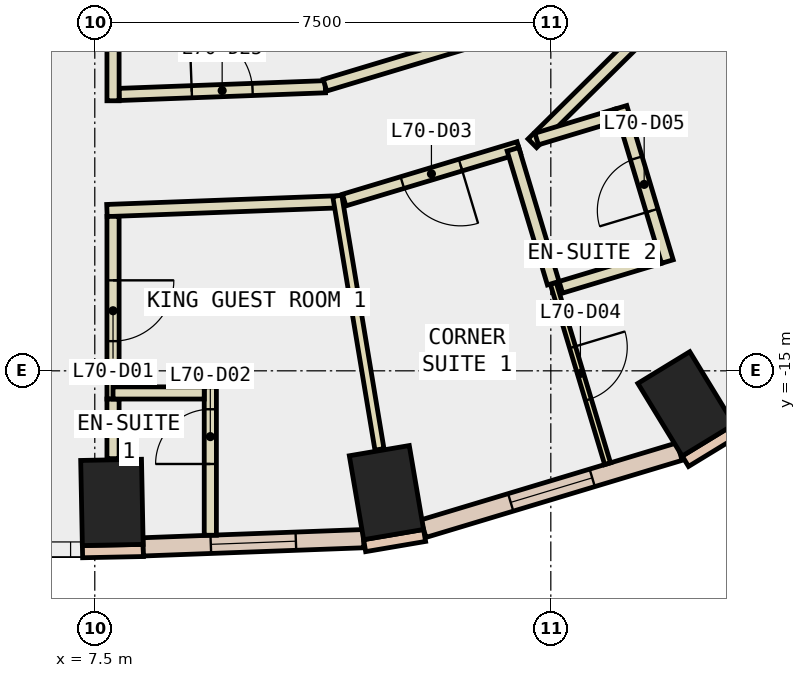
"""IFC4 building model, lengths in metres.
Left out: names, types, materials, properties, quantities, classifications, styles, units other than length and angle.
Written with IfcOpenShell. Run it as: python <this file> out.ifc"""

import sys

from ifc_helpers import new_model, si_unit, direction, frame, frame_2d, origin, origin_2d, place, context, subcontext, project, spatial, rectangle, extrude, element, fill, save


model = new_model("IFC4")
c1 = context("Model", 3, precision=1e-05, world=origin(), true_north=direction((0.0, 1.0)))
c2 = subcontext(c1, "Body", "Model", "MODEL_VIEW")
j1 = project(units=[si_unit("LENGTHUNIT", "METRE"), si_unit("PLANEANGLEUNIT", "RADIAN")], contexts=[c1])
p1 = place(None, origin())
s1 = spatial("IfcSite", under=j1, at=p1, CompositionType="ELEMENT")
p2 = place(p1, origin())
s2 = spatial("IfcBuilding", under=s1, at=p2, CompositionType="ELEMENT")
p3 = place(p2, frame((0.0, 0.0, 300.8)))
s3 = spatial("IfcBuildingStorey", under=s2, at=p3, CompositionType="ELEMENT", Elevation=300.8)
for number, where, z_axis, x_axis in (
    (1, (7.782, -17.164, -0.34), (0.0, 0.0, 1.0), (1.0, 0.02, 0.0)),
    (2, (12.297, -17.003, -0.34), (0.0, 0.0, 1.0), (0.986, 0.168, 0.0)),
    (3, (17.223, -15.544, -0.34), (0.0, 0.0, 1.0), (0.854, 0.521, 0.0)),
):
    element("IfcColumn", number, at=place(p3, frame(where, z_axis=z_axis, x_axis=x_axis)), inside=s3, PredefinedType="COLUMN", context=c2, shape_type="SweptSolid", body=[
        extrude(rectangle(XDim=1.0, YDim=1.4, at=origin_2d()), origin(), (0.0, 0.0, 1.0), 3.6),
    ])
for number, where, z_axis, x_axis in (
    (4, (7.298, -17.974, 0.0), (0.0, 0.0, 1.0), (1.0, 0.02, 0.0)),
    (5, (11.938, -17.875, 0.0), (0.0, 0.0, 1.0), (0.986, 0.168, 0.0)),
):
    element("IfcWall", number, at=place(p3, frame(where, z_axis=z_axis, x_axis=x_axis)), inside=s3, PredefinedType="STANDARD", context=c2, shape_type="SweptSolid", body=[
        extrude(rectangle(XDim=1.0, YDim=0.2, at=frame_2d((0.5, 0.0))), origin(), (0.0, 0.0, 1.0), 3.26),
    ])
p4 = place(p3, frame((17.213, -16.487, 0.0), z_axis=(0.0, 0.0, 1.0), x_axis=(0.853679739553, 0.520798331677, 0.0)))
e6 = element("IfcWall", 6, at=p4, inside=s3, PredefinedType="STANDARD", context=c2, shape_type="SweptSolid", body=[
    extrude(rectangle(XDim=1.0, YDim=0.2, at=frame_2d((0.5, 0.0))), origin(), (0.0, 0.0, 1.0), 3.26),
])
p5 = place(p3, frame((8.296, -17.895, 0.0), z_axis=(0.0, 0.0, 1.0), x_axis=(0.999306787149, 0.037228284377, 0.0)))
e7 = element("IfcWall", 7, at=p5, inside=s3, PredefinedType="STANDARD", context=c2, shape_type="SweptSolid", body=[
    extrude(rectangle(XDim=3.626, YDim=0.3, at=frame_2d((1.813, 0.0))), origin(), (0.0, 0.0, 1.0), 3.26),
])
p6 = place(p5, frame((1.113, 0.0, 0.9)))
e8 = element("IfcOpeningElement", 8, at=p6, cuts=e7, PredefinedType="OPENING", context=c2, shape_type="SweptSolid", body=[
    extrude(rectangle(XDim=1.4, YDim=2.0, at=frame_2d((0.7, 1.0))), frame((0.0, 0.16, 0.0), z_axis=(0.0, -1.0, 0.0), x_axis=(1.0, 0.0, 0.0)), (0.0, 0.0, 1.0), 0.32),
])
p7 = place(p3, frame((12.904, -17.596, 0.0), z_axis=(0.0, 0.0, 1.0), x_axis=(0.957563190743, 0.288223412884, 0.0)))
e9 = element("IfcWall", 9, at=p7, inside=s3, PredefinedType="STANDARD", context=c2, shape_type="SweptSolid", body=[
    extrude(rectangle(XDim=4.4, YDim=0.3, at=frame_2d((2.2, 0.0))), origin(), (0.0, 0.0, 1.0), 3.26),
])
p8 = place(p7, frame((1.5, 0.0, 0.9)))
e10 = element("IfcOpeningElement", 10, at=p8, cuts=e9, PredefinedType="OPENING", context=c2, shape_type="SweptSolid", body=[
    extrude(rectangle(XDim=1.4, YDim=2.0, at=frame_2d((0.7, 1.0))), frame((0.0, 0.16, 0.0), z_axis=(0.0, -1.0, 0.0), x_axis=(1.0, 0.0, 0.0)), (0.0, 0.0, 1.0), 0.32),
])
p9 = place(p3, frame((17.976, -15.82, 0.0), z_axis=(0.0, 0.0, 1.0), x_axis=(0.710893699296, 0.703299472701, 0.0)))
e11 = element("IfcWall", 11, at=p9, inside=s3, PredefinedType="STANDARD", context=c2, shape_type="SweptSolid", body=[
    extrude(rectangle(XDim=3.954, YDim=0.3, at=frame_2d((1.977, 0.0))), origin(), (0.0, 0.0, 1.0), 3.26),
])
p10 = place(p9, frame((1.277, 0.0, 0.9)))
e12 = element("IfcOpeningElement", 12, at=p10, cuts=e11, PredefinedType="OPENING", context=c2, shape_type="SweptSolid", body=[
    extrude(rectangle(XDim=1.4, YDim=2.0, at=frame_2d((0.7, 1.0))), frame((0.0, 0.16, 0.0), z_axis=(0.0, -1.0, 0.0), x_axis=(1.0, 0.0, 0.0)), (0.0, 0.0, 1.0), 0.32),
])
p11 = place(p3, frame((7.9, -10.455, 0.0), z_axis=(0.0, 0.0, 1.0), x_axis=(0.999297278907, 0.037482640915, 0.0)))
e13 = element("IfcWall", 13, at=p11, inside=s3, PredefinedType="PARTITIONING", context=c2, shape_type="SweptSolid", body=[
    extrude(rectangle(XDim=3.394, YDim=0.2, at=frame_2d((1.697, 0.0))), origin(), (0.0, 0.0, 1.0), 3.26),
])
p12 = place(p11, frame((1.196, 0.0, 0.0)))
e14 = element("IfcOpeningElement", 14, at=p12, cuts=e13, PredefinedType="OPENING", context=c2, shape_type="SweptSolid", body=[
    extrude(rectangle(XDim=1.0, YDim=2.1, at=frame_2d((0.5, 1.05))), frame((0.0, 0.11, 0.0), z_axis=(0.0, -1.0, 0.0), x_axis=(1.0, 0.0, 0.0)), (0.0, 0.0, 1.0), 0.22),
])
p13 = place(p3, frame((11.286, -10.303, 0.0), z_axis=(0.0, 0.0, 1.0), x_axis=(0.957555754851, 0.288248115955, 0.0)))
e15 = element("IfcWall", 15, at=p13, inside=s3, PredefinedType="PARTITIONING", context=c2, shape_type="SweptSolid", body=[
    extrude(rectangle(XDim=2.612, YDim=0.2, at=frame_2d((1.306, 0.0))), origin(), (0.0, 0.0, 1.0), 3.26),
])
p14 = place(p3, frame((11.53, -12.22, 0.0), z_axis=(0.0, 0.0, 1.0), x_axis=(-0.999293554816, -0.037581794833, 0.0)))
e16 = element("IfcWall", 16, at=p14, inside=s3, PredefinedType="PARTITIONING", context=c2, shape_type="SweptSolid", body=[
    extrude(rectangle(XDim=3.833, YDim=0.2, at=frame_2d((1.917, 0.0))), origin(), (0.0, 0.0, 1.0), 3.26),
])
p15 = place(p3, frame((14.473, -11.328, 0.0), z_axis=(0.0, 0.0, 1.0), x_axis=(-0.957599689503, -0.288102125406, 0.0)))
e17 = element("IfcWall", 17, at=p15, inside=s3, PredefinedType="PARTITIONING", context=c2, shape_type="SweptSolid", body=[
    extrude(rectangle(XDim=2.999, YDim=0.2, at=frame_2d((1.5, 0.0))), origin(), (0.0, 0.0, 1.0), 3.26),
])
p16 = place(p15, frame((1.0, 0.0, 0.0)))
e18 = element("IfcOpeningElement", 18, at=p16, cuts=e17, PredefinedType="OPENING", context=c2, shape_type="SweptSolid", body=[
    extrude(rectangle(XDim=1.0, YDim=2.1, at=frame_2d((0.5, 1.05))), frame((0.0, 0.11, 0.0), z_axis=(0.0, -1.0, 0.0), x_axis=(1.0, 0.0, 0.0)), (0.0, 0.0, 1.0), 0.22),
])
p17 = place(p3, frame((16.537, -9.436, 0.0), z_axis=(0.0, 0.0, 1.0), x_axis=(-0.710773151724, -0.703421301063, 0.0)))
e19 = element("IfcWall", 19, at=p17, inside=s3, PredefinedType="PARTITIONING", context=c2, shape_type="SweptSolid", body=[
    extrude(rectangle(XDim=2.59, YDim=0.2, at=frame_2d((1.295, 0.0))), origin(), (0.0, 0.0, 1.0), 3.26),
])
p18 = place(p3, frame((7.8, -5.899, 0.0), z_axis=(0.0, 0.0, 1.0), x_axis=(0.0, -1.0, 0.0)))
e20 = element("IfcWall", 20, at=p18, inside=s3, PredefinedType="PARTITIONING", context=c2, shape_type="SweptSolid", body=[
    extrude(rectangle(XDim=4.66, YDim=0.2, at=frame_2d((2.33, 0.0))), origin(), (0.0, 0.0, 1.0), 3.26),
])
p19 = place(p3, frame((7.8, -12.46, 0.0), z_axis=(0.0, 0.0, 1.0), x_axis=(0.0, -1.0, 0.0)))
e21 = element("IfcWall", 21, at=p19, inside=s3, PredefinedType="PARTITIONING", context=c2, shape_type="SweptSolid", body=[
    extrude(rectangle(XDim=3.004, YDim=0.2, at=frame_2d((1.502, 0.0))), origin(), (0.0, 0.0, 1.0), 3.26),
])
p20 = place(p19, frame((1.052, 0.0, 0.0)))
e22 = element("IfcOpeningElement", 22, at=p20, cuts=e21, PredefinedType="OPENING", context=c2, shape_type="SweptSolid", body=[
    extrude(rectangle(XDim=1.0, YDim=2.1, at=frame_2d((0.5, 1.05))), frame((0.0, 0.11, 0.0), z_axis=(0.0, -1.0, 0.0), x_axis=(1.0, 0.0, 0.0)), (0.0, 0.0, 1.0), 0.22),
])
p21 = place(p3, frame((7.8, -15.464, 0.0), z_axis=(0.0, 0.0, 1.0), x_axis=(0.0, -1.0, 0.0)))
e23 = element("IfcWall", 23, at=p21, inside=s3, PredefinedType="PARTITIONING", context=c2, shape_type="SweptSolid", body=[
    extrude(rectangle(XDim=0.98, YDim=0.2, at=frame_2d((0.49, 0.0))), origin(), (0.0, 0.0, 1.0), 3.26),
])
p22 = place(p3, frame((9.4, -17.704, 0.0), z_axis=(0.0, 0.0, 1.0), x_axis=(0.0, 1.0, 0.0)))
e24 = element("IfcWall", 24, at=p22, inside=s3, PredefinedType="PARTITIONING", context=c2, shape_type="SweptSolid", body=[
    extrude(rectangle(XDim=2.44, YDim=0.2, at=frame_2d((1.22, 0.0))), origin(), (0.0, 0.0, 1.0), 3.26),
])
p23 = place(p22, frame((1.172, 0.0, 0.0)))
e25 = element("IfcOpeningElement", 25, at=p23, cuts=e24, PredefinedType="OPENING", context=c2, shape_type="SweptSolid", body=[
    extrude(rectangle(XDim=0.9, YDim=2.1, at=frame_2d((0.45, 1.05))), frame((0.0, 0.11, 0.0), z_axis=(0.0, -1.0, 0.0), x_axis=(1.0, 0.0, 0.0)), (0.0, 0.0, 1.0), 0.22),
])
p24 = place(p3, frame((9.3, -15.364, 0.0), z_axis=(0.0, 0.0, 1.0), x_axis=(-1.0, 0.0, 0.0)))
e26 = element("IfcWall", 26, at=p24, inside=s3, PredefinedType="PARTITIONING", context=c2, shape_type="SweptSolid", body=[
    extrude(rectangle(XDim=1.5, YDim=0.2, at=frame_2d((0.75, 0.0))), origin(), (0.0, 0.0, 1.0), 3.26),
])
p25 = place(p3, frame((11.488, -12.123, 0.0), z_axis=(0.0, 0.0, 1.0), x_axis=(0.164174159643, -0.986431368776, 0.0)))
e27 = element("IfcWall", 27, at=p25, inside=s3, PredefinedType="PARTITIONING", context=c2, shape_type="SweptSolid", body=[
    extrude(rectangle(XDim=4.226, YDim=0.15, at=frame_2d((2.113, 0.0))), origin(), (0.0, 0.0, 1.0), 3.26),
])
p26 = place(p3, frame((15.04, -13.559, 0.0), z_axis=(0.0, 0.0, 1.0), x_axis=(0.288337370875, -0.957528882362, 0.0)))
e28 = element("IfcWall", 28, at=p26, inside=s3, PredefinedType="PARTITIONING", context=c2, shape_type="SweptSolid", body=[
    extrude(rectangle(XDim=3.101, YDim=0.1, at=frame_2d((1.55, 0.0))), origin(), (0.0, 0.0, 1.0), 3.26),
])
p27 = place(p26, frame((1.1, 0.0, 0.0)))
e29 = element("IfcOpeningElement", 29, at=p27, cuts=e28, PredefinedType="OPENING", context=c2, shape_type="SweptSolid", body=[
    extrude(rectangle(XDim=0.9, YDim=2.1, at=frame_2d((0.45, 1.05))), frame((0.0, 0.06, 0.0), z_axis=(0.0, -1.0, 0.0), x_axis=(1.0, 0.0, 0.0)), (0.0, 0.0, 1.0), 0.12),
])
p28 = place(p3, frame((14.378, -11.357, 0.0), z_axis=(0.0, 0.0, 1.0), x_axis=(0.287932252498, -0.957650780802, 0.0)))
e30 = element("IfcWall", 30, at=p28, inside=s3, PredefinedType="PARTITIONING", context=c2, shape_type="SweptSolid", body=[
    extrude(rectangle(XDim=2.3, YDim=0.2, at=frame_2d((1.15, 0.0))), origin(), (0.0, 0.0, 1.0), 3.26),
])
p29 = place(p3, frame((15.165, -13.626, 0.0), z_axis=(0.0, 0.0, 1.0), x_axis=(0.957565028189, 0.288217308275, 0.0)))
e31 = element("IfcWall", 31, at=p29, inside=s3, PredefinedType="PARTITIONING", context=c2, shape_type="SweptSolid", body=[
    extrude(rectangle(XDim=1.7, YDim=0.2, at=frame_2d((0.85, 0.0))), origin(), (0.0, 0.0, 1.0), 3.26),
])
p30 = place(p3, frame((16.917, -13.203, 0.0), z_axis=(0.0, 0.0, 1.0), x_axis=(-0.287998855134, 0.957630753183, 0.0)))
e32 = element("IfcWall", 32, at=p30, inside=s3, PredefinedType="PARTITIONING", context=c2, shape_type="SweptSolid", body=[
    extrude(rectangle(XDim=2.649, YDim=0.2, at=frame_2d((1.325, 0.0))), origin(), (0.0, 0.0, 1.0), 3.26),
])
p31 = place(p30, frame((0.875, 0.0, 0.0)))
e33 = element("IfcOpeningElement", 33, at=p31, cuts=e32, PredefinedType="OPENING", context=c2, shape_type="SweptSolid", body=[
    extrude(rectangle(XDim=0.9, YDim=2.1, at=frame_2d((0.45, 1.05))), frame((0.0, 0.11, 0.0), z_axis=(0.0, -1.0, 0.0), x_axis=(1.0, 0.0, 0.0)), (0.0, 0.0, 1.0), 0.22),
])
p32 = place(p3, frame((16.087, -10.79, 0.0), z_axis=(0.0, 0.0, 1.0), x_axis=(-0.957425655367, -0.288679951581, 0.0)))
e34 = element("IfcWall", 34, at=p32, inside=s3, PredefinedType="PARTITIONING", context=c2, shape_type="SweptSolid", body=[
    extrude(rectangle(XDim=1.378, YDim=0.2, at=frame_2d((0.689, 0.0))), origin(), (0.0, 0.0, 1.0), 3.26),
])
p33 = place(p6, origin())
e35 = element("IfcWindow", 35, at=p33, inside=s3, PartitioningType="SINGLE_PANEL", PredefinedType="WINDOW", context=c2, shape_type="SweptSolid", body=[
    extrude(rectangle(XDim=1.4, YDim=2.0, at=frame_2d((0.7, 1.0))), frame((0.0, 0.03, 0.0), z_axis=(0.0, -1.0, 0.0), x_axis=(1.0, 0.0, 0.0)), (0.0, 0.0, 1.0), 0.06),
])
fill(e8, e35)
p34 = place(p8, origin())
e36 = element("IfcWindow", 36, at=p34, inside=s3, PartitioningType="SINGLE_PANEL", PredefinedType="WINDOW", context=c2, shape_type="SweptSolid", body=[
    extrude(rectangle(XDim=1.4, YDim=2.0, at=frame_2d((0.7, 1.0))), frame((0.0, 0.03, 0.0), z_axis=(0.0, -1.0, 0.0), x_axis=(1.0, 0.0, 0.0)), (0.0, 0.0, 1.0), 0.06),
])
fill(e10, e36)
p35 = place(p20, origin())
e37 = element("IfcDoor", 37, at=p35, inside=s3, OperationType="SINGLE_SWING_RIGHT", PredefinedType="DOOR", context=c2, shape_type="SweptSolid", body=[
    extrude(rectangle(XDim=1.0, YDim=2.1, at=frame_2d((0.5, 1.05))), frame((0.0, 0.025, 0.0), z_axis=(0.0, -1.0, 0.0), x_axis=(1.0, 0.0, 0.0)), (0.0, 0.0, 1.0), 0.05),
])
fill(e22, e37)
p36 = place(p23, origin())
e38 = element("IfcDoor", 38, at=p36, inside=s3, OperationType="SINGLE_SWING_RIGHT", PredefinedType="DOOR", context=c2, shape_type="SweptSolid", body=[
    extrude(rectangle(XDim=0.9, YDim=2.1, at=frame_2d((0.45, 1.05))), frame((0.0, 0.025, 0.0), z_axis=(0.0, -1.0, 0.0), x_axis=(1.0, 0.0, 0.0)), (0.0, 0.0, 1.0), 0.05),
])
fill(e25, e38)
p37 = place(p16, origin())
e39 = element("IfcDoor", 39, at=p37, inside=s3, OperationType="SINGLE_SWING_LEFT", PredefinedType="DOOR", context=c2, shape_type="SweptSolid", body=[
    extrude(rectangle(XDim=1.0, YDim=2.1, at=frame_2d((0.5, 1.05))), frame((0.0, 0.025, 0.0), z_axis=(0.0, -1.0, 0.0), x_axis=(1.0, 0.0, 0.0)), (0.0, 0.0, 1.0), 0.05),
])
fill(e18, e39)
p38 = place(p27, origin())
e40 = element("IfcDoor", 40, at=p38, inside=s3, OperationType="SINGLE_SWING_LEFT", PredefinedType="DOOR", context=c2, shape_type="SweptSolid", body=[
    extrude(rectangle(XDim=0.9, YDim=2.1, at=frame_2d((0.45, 1.05))), frame((0.0, 0.025, 0.0), z_axis=(0.0, -1.0, 0.0), x_axis=(1.0, 0.0, 0.0)), (0.0, 0.0, 1.0), 0.05),
])
fill(e29, e40)
p39 = place(p31, origin())
e41 = element("IfcDoor", 41, at=p39, inside=s3, OperationType="SINGLE_SWING_LEFT", PredefinedType="DOOR", context=c2, shape_type="SweptSolid", body=[
    extrude(rectangle(XDim=0.9, YDim=2.1, at=frame_2d((0.45, 1.05))), frame((0.0, 0.025, 0.0), z_axis=(0.0, -1.0, 0.0), x_axis=(1.0, 0.0, 0.0)), (0.0, 0.0, 1.0), 0.05),
])
fill(e33, e41)
p40 = place(p12, origin())
e42 = element("IfcDoor", 42, at=p40, inside=s3, OperationType="SINGLE_SWING_LEFT", PredefinedType="DOOR", context=c2, shape_type="SweptSolid", body=[
    extrude(rectangle(XDim=1.0, YDim=2.1, at=frame_2d((0.5, 1.05))), frame((0.0, 0.025, 0.0), z_axis=(0.0, -1.0, 0.0), x_axis=(1.0, 0.0, 0.0)), (0.0, 0.0, 1.0), 0.05),
])
fill(e14, e42)
save(model, sys.argv[1])
